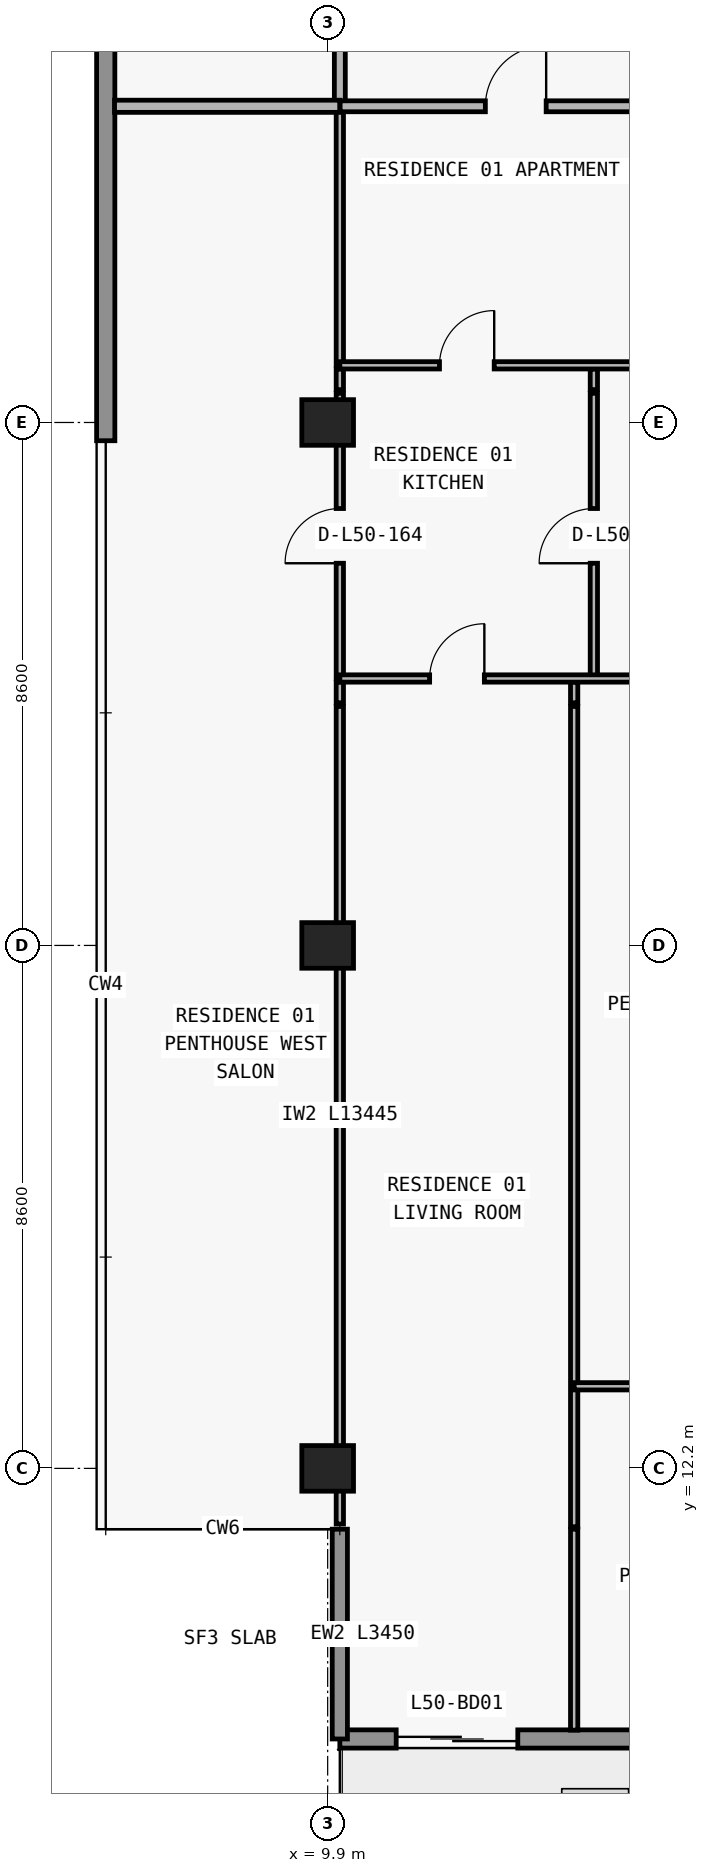
"""IFC4 building model, lengths in metres.
Left out: names, types, materials, properties, quantities, classifications, styles, units other than length and angle.
Written with IfcOpenShell. Run it as: python <this file> out.ifc"""

import sys

from ifc_helpers import new_model, si_unit, direction, frame, frame_2d, origin, origin_2d, place, context, subcontext, project, spatial, rectangle, extrude, element, fill, save


model = new_model("IFC4")
c1 = context("Model", 3, precision=1e-05, world=origin(), true_north=direction((0.0, 1.0)))
c2 = subcontext(c1, "Body", "Model", "MODEL_VIEW")
j1 = project(units=[si_unit("LENGTHUNIT", "METRE"), si_unit("PLANEANGLEUNIT", "RADIAN")], contexts=[c1])
p1 = place(None, origin())
s1 = spatial("IfcSite", under=j1, at=p1, CompositionType="ELEMENT")
p2 = place(p1, origin())
s2 = spatial("IfcBuilding", under=s1, at=p2, CompositionType="ELEMENT")
p3 = place(p2, frame((0.0, 0.0, 180.3)))
s3 = spatial("IfcBuildingStorey", under=s2, at=p3, CompositionType="ELEMENT", Elevation=180.3)
for number, where, z_axis, x_axis in (
    (1, (9.9, 12.2, 0.0), (0.0, 0.0, 1.0), (1.0, 0.0, 0.0)),
    (2, (9.9, 20.8, 0.0), (0.0, 0.0, 1.0), (1.0, 0.0, 0.0)),
    (3, (9.9, 29.4, 0.0), (0.0, 0.0, 1.0), (1.0, 0.0, 0.0)),
):
    element("IfcColumn", number, at=place(p3, frame(where, z_axis=z_axis, x_axis=x_axis)), inside=s3, PredefinedType="COLUMN", context=c2, shape_type="SweptSolid", body=[
        extrude(rectangle(XDim=0.85, YDim=0.75, at=origin_2d()), origin(), (0.0, 0.0, 1.0), 3.0),
    ])
p4 = place(p3, frame((67.7, 7.75, 0.0), z_axis=(0.0, 0.0, 1.0), x_axis=(-1.0, 0.0, 0.0)))
e4 = element("IfcWall", 4, at=p4, inside=s3, PredefinedType="STANDARD", context=c2, shape_type="SweptSolid", body=[
    extrude(rectangle(XDim=57.6, YDim=0.3, at=frame_2d((28.8, 0.0))), origin(), (0.0, 0.0, 1.0), 3.0),
])
p5 = place(p4, frame((54.673, 0.0, 0.0)))
e5 = element("IfcOpeningElement", 5, at=p5, cuts=e4, PredefinedType="OPENING", context=c2, shape_type="SweptSolid", body=[
    extrude(rectangle(XDim=2.0, YDim=2.3, at=frame_2d((1.0, 1.15))), frame((0.0, 0.16, 0.0), z_axis=(0.0, -1.0, 0.0), x_axis=(1.0, 0.0, 0.0)), (0.0, 0.0, 1.0), 0.32),
])
p6 = place(p4, frame((50.473, 0.0, 0.85)))
e6 = element("IfcOpeningElement", 6, at=p6, cuts=e4, PredefinedType="OPENING", context=c2, shape_type="SweptSolid", body=[
    extrude(rectangle(XDim=2.2, YDim=1.55, at=frame_2d((1.1, 0.775))), frame((0.0, 0.16, 0.0), z_axis=(0.0, -1.0, 0.0), x_axis=(1.0, 0.0, 0.0)), (0.0, 0.0, 1.0), 0.32),
])
p7 = place(p4, frame((46.09, 0.0, 0.0)))
e7 = element("IfcOpeningElement", 7, at=p7, cuts=e4, PredefinedType="OPENING", context=c2, shape_type="SweptSolid", body=[
    extrude(rectangle(XDim=2.0, YDim=2.3, at=frame_2d((1.0, 1.15))), frame((0.0, 0.16, 0.0), z_axis=(0.0, -1.0, 0.0), x_axis=(1.0, 0.0, 0.0)), (0.0, 0.0, 1.0), 0.32),
])
p8 = place(p4, frame((41.99, 0.0, 0.85)))
e8 = element("IfcOpeningElement", 8, at=p8, cuts=e4, PredefinedType="OPENING", context=c2, shape_type="SweptSolid", body=[
    extrude(rectangle(XDim=1.8, YDim=1.55, at=frame_2d((0.9, 0.775))), frame((0.0, 0.16, 0.0), z_axis=(0.0, -1.0, 0.0), x_axis=(1.0, 0.0, 0.0)), (0.0, 0.0, 1.0), 0.32),
])
p9 = place(p4, frame((38.09, 0.0, 0.0)))
e9 = element("IfcOpeningElement", 9, at=p9, cuts=e4, PredefinedType="OPENING", context=c2, shape_type="SweptSolid", body=[
    extrude(rectangle(XDim=2.0, YDim=2.3, at=frame_2d((1.0, 1.15))), frame((0.0, 0.16, 0.0), z_axis=(0.0, -1.0, 0.0), x_axis=(1.0, 0.0, 0.0)), (0.0, 0.0, 1.0), 0.32),
])
p10 = place(p4, frame((33.41, 0.0, 0.65)))
e10 = element("IfcOpeningElement", 10, at=p10, cuts=e4, PredefinedType="OPENING", context=c2, shape_type="SweptSolid", body=[
    extrude(rectangle(XDim=2.6, YDim=1.85, at=frame_2d((1.3, 0.925))), frame((0.0, 0.16, 0.0), z_axis=(0.0, -1.0, 0.0), x_axis=(1.0, 0.0, 0.0)), (0.0, 0.0, 1.0), 0.32),
])
p11 = place(p4, frame((27.7, 0.0, 0.85)))
e11 = element("IfcOpeningElement", 11, at=p11, cuts=e4, PredefinedType="OPENING", context=c2, shape_type="SweptSolid", body=[
    extrude(rectangle(XDim=2.2, YDim=1.55, at=frame_2d((1.1, 0.775))), frame((0.0, 0.16, 0.0), z_axis=(0.0, -1.0, 0.0), x_axis=(1.0, 0.0, 0.0)), (0.0, 0.0, 1.0), 0.32),
])
p12 = place(p4, frame((19.7, 0.0, 0.85)))
e12 = element("IfcOpeningElement", 12, at=p12, cuts=e4, PredefinedType="OPENING", context=c2, shape_type="SweptSolid", body=[
    extrude(rectangle(XDim=2.2, YDim=1.55, at=frame_2d((1.1, 0.775))), frame((0.0, 0.16, 0.0), z_axis=(0.0, -1.0, 0.0), x_axis=(1.0, 0.0, 0.0)), (0.0, 0.0, 1.0), 0.32),
])
p13 = place(p4, frame((13.29, 0.0, 0.0)))
e13 = element("IfcOpeningElement", 13, at=p13, cuts=e4, PredefinedType="OPENING", context=c2, shape_type="SweptSolid", body=[
    extrude(rectangle(XDim=2.0, YDim=2.3, at=frame_2d((1.0, 1.15))), frame((0.0, 0.16, 0.0), z_axis=(0.0, -1.0, 0.0), x_axis=(1.0, 0.0, 0.0)), (0.0, 0.0, 1.0), 0.32),
])
p14 = place(p4, frame((9.19, 0.0, 0.85)))
e14 = element("IfcOpeningElement", 14, at=p14, cuts=e4, PredefinedType="OPENING", context=c2, shape_type="SweptSolid", body=[
    extrude(rectangle(XDim=1.8, YDim=1.55, at=frame_2d((0.9, 0.775))), frame((0.0, 0.16, 0.0), z_axis=(0.0, -1.0, 0.0), x_axis=(1.0, 0.0, 0.0)), (0.0, 0.0, 1.0), 0.32),
])
p15 = place(p4, frame((5.273, 0.0, 0.0)))
e15 = element("IfcOpeningElement", 15, at=p15, cuts=e4, PredefinedType="OPENING", context=c2, shape_type="SweptSolid", body=[
    extrude(rectangle(XDim=2.0, YDim=2.3, at=frame_2d((1.0, 1.15))), frame((0.0, 0.16, 0.0), z_axis=(0.0, -1.0, 0.0), x_axis=(1.0, 0.0, 0.0)), (0.0, 0.0, 1.0), 0.32),
])
p16 = place(p4, frame((1.073, 0.0, 0.85)))
e16 = element("IfcOpeningElement", 16, at=p16, cuts=e4, PredefinedType="OPENING", context=c2, shape_type="SweptSolid", body=[
    extrude(rectangle(XDim=2.2, YDim=1.55, at=frame_2d((1.1, 0.775))), frame((0.0, 0.16, 0.0), z_axis=(0.0, -1.0, 0.0), x_axis=(1.0, 0.0, 0.0)), (0.0, 0.0, 1.0), 0.32),
])
p17 = place(p3, frame((10.1, 11.2, 0.0), z_axis=(0.0, 0.0, 1.0), x_axis=(0.0, -1.0, 0.0)))
e17 = element("IfcWall", 17, at=p17, inside=s3, PredefinedType="ELEMENTEDWALL", context=c2, shape_type="SweptSolid", body=[
    extrude(rectangle(XDim=3.45, YDim=0.25, at=frame_2d((1.725, 0.0))), origin(), (0.0, 0.0, 1.0), 3.0),
])
p18 = place(p3, frame((6.25, 29.1, 0.0), z_axis=(0.0, 0.0, 1.0), x_axis=(0.0, 1.0, 0.0)))
e18 = element("IfcWall", 18, at=p18, inside=s3, PredefinedType="STANDARD", context=c2, shape_type="SweptSolid", body=[
    extrude(rectangle(XDim=17.9, YDim=0.3, at=frame_2d((8.95, 0.0))), origin(), (0.0, 0.0, 1.0), 3.0),
])
p19 = place(p3, frame((10.1, 11.285, 0.0), z_axis=(0.0, 0.0, 1.0), x_axis=(0.0, 1.0, 0.0)))
e19 = element("IfcWall", 19, at=p19, inside=s3, PredefinedType="PARTITIONING", context=c2, shape_type="SweptSolid", body=[
    extrude(rectangle(XDim=13.445, YDim=0.12, at=frame_2d((6.723, 0.0))), origin(), (0.0, 0.0, 1.0), 2.213),
])
p20 = place(p3, frame((10.1, 24.79, 0.0), z_axis=(0.0, 0.0, 1.0), x_axis=(0.0, 1.0, 0.0)))
e20 = element("IfcWall", 20, at=p20, inside=s3, PredefinedType="PARTITIONING", context=c2, shape_type="SweptSolid", body=[
    extrude(rectangle(XDim=0.34, YDim=0.12, at=frame_2d((0.17, 0.0))), origin(), (0.0, 0.0, 1.0), 2.213),
])
p21 = place(p3, frame((10.1, 25.19, 0.0), z_axis=(0.0, 0.0, 1.0), x_axis=(0.0, 1.0, 0.0)))
e21 = element("IfcWall", 21, at=p21, inside=s3, PredefinedType="PARTITIONING", context=c2, shape_type="SweptSolid", body=[
    extrude(rectangle(XDim=4.69, YDim=0.12, at=frame_2d((2.345, 0.0))), origin(), (0.0, 0.0, 1.0), 2.213),
])
p22 = place(p21, frame((1.895, 0.0, 0.0)))
e22 = element("IfcOpeningElement", 22, at=p22, cuts=e21, PredefinedType="OPENING", context=c2, shape_type="SweptSolid", body=[
    extrude(rectangle(XDim=0.9, YDim=2.15, at=frame_2d((0.45, 1.075))), frame((0.0, 0.07, 0.0), z_axis=(0.0, -1.0, 0.0), x_axis=(1.0, 0.0, 0.0)), (0.0, 0.0, 1.0), 0.14),
])
p23 = place(p3, frame((10.1, 29.94, 0.0), z_axis=(0.0, 0.0, 1.0), x_axis=(0.0, 1.0, 0.0)))
e23 = element("IfcWall", 23, at=p23, inside=s3, PredefinedType="PARTITIONING", context=c2, shape_type="SweptSolid", body=[
    extrude(rectangle(XDim=0.34, YDim=0.12, at=frame_2d((0.17, 0.0))), origin(), (0.0, 0.0, 1.0), 2.213),
])
p24 = place(p3, frame((10.1, 30.34, 0.0), z_axis=(0.0, 0.0, 1.0), x_axis=(0.0, 1.0, 0.0)))
e24 = element("IfcWall", 24, at=p24, inside=s3, PredefinedType="PARTITIONING", context=c2, shape_type="SweptSolid", body=[
    extrude(rectangle(XDim=4.26, YDim=0.12, at=frame_2d((2.13, 0.0))), origin(), (0.0, 0.0, 1.0), 2.213),
])
p25 = place(p3, frame((10.1, 34.605, 0.0), z_axis=(0.0, 0.0, 1.0), x_axis=(0.0, 1.0, 0.0)))
e25 = element("IfcWall", 25, at=p25, inside=s3, PredefinedType="PARTITIONING", context=c2, shape_type="SweptSolid", body=[
    extrude(rectangle(XDim=2.345, YDim=0.18, at=frame_2d((1.172, 0.0))), origin(), (0.0, 0.0, 1.0), 2.213),
])
p26 = place(p3, frame((13.954, 7.895, 0.0), z_axis=(0.0, 0.0, 1.0), x_axis=(0.0, 1.0, 0.0)))
e26 = element("IfcWall", 26, at=p26, inside=s3, PredefinedType="PARTITIONING", context=c2, shape_type="SweptSolid", body=[
    extrude(rectangle(XDim=3.305, YDim=0.12, at=frame_2d((1.652, 0.0))), origin(), (0.0, 0.0, 1.0), 3.0),
])
p27 = place(p3, frame((13.954, 11.24, 0.0), z_axis=(0.0, 0.0, 1.0), x_axis=(0.0, 1.0, 0.0)))
e27 = element("IfcWall", 27, at=p27, inside=s3, PredefinedType="PARTITIONING", context=c2, shape_type="SweptSolid", body=[
    extrude(rectangle(XDim=13.49, YDim=0.12, at=frame_2d((6.745, 0.0))), origin(), (0.0, 0.0, 1.0), 3.0),
])
p28 = place(p3, frame((13.954, 24.79, 0.0), z_axis=(0.0, 0.0, 1.0), x_axis=(0.0, 1.0, 0.0)))
e28 = element("IfcWall", 28, at=p28, inside=s3, PredefinedType="PARTITIONING", context=c2, shape_type="SweptSolid", body=[
    extrude(rectangle(XDim=0.34, YDim=0.12, at=frame_2d((0.17, 0.0))), origin(), (0.0, 0.0, 1.0), 3.0),
])
p29 = place(p3, frame((14.278, 25.19, 0.0), z_axis=(0.0, 0.0, 1.0), x_axis=(0.0, 1.0, 0.0)))
e29 = element("IfcWall", 29, at=p29, inside=s3, PredefinedType="PARTITIONING", context=c2, shape_type="SweptSolid", body=[
    extrude(rectangle(XDim=4.69, YDim=0.12, at=frame_2d((2.345, 0.0))), origin(), (0.0, 0.0, 1.0), 3.0),
])
p30 = place(p29, frame((1.895, 0.0, 0.0)))
e30 = element("IfcOpeningElement", 30, at=p30, cuts=e29, PredefinedType="OPENING", context=c2, shape_type="SweptSolid", body=[
    extrude(rectangle(XDim=0.9, YDim=2.15, at=frame_2d((0.45, 1.075))), frame((0.0, 0.07, 0.0), z_axis=(0.0, -1.0, 0.0), x_axis=(1.0, 0.0, 0.0)), (0.0, 0.0, 1.0), 0.14),
])
p31 = place(p3, frame((14.278, 29.94, 0.0), z_axis=(0.0, 0.0, 1.0), x_axis=(0.0, 1.0, 0.0)))
e31 = element("IfcWall", 31, at=p31, inside=s3, PredefinedType="PARTITIONING", context=c2, shape_type="SweptSolid", body=[
    extrude(rectangle(XDim=0.34, YDim=0.12, at=frame_2d((0.17, 0.0))), origin(), (0.0, 0.0, 1.0), 3.0),
])
p32 = place(p3, frame((13.954, 13.55, 0.0), z_axis=(0.0, 0.0, 1.0), x_axis=(1.0, 0.0, 0.0)))
e32 = element("IfcWall", 32, at=p32, inside=s3, PredefinedType="PARTITIONING", context=c2, shape_type="SweptSolid", body=[
    extrude(rectangle(XDim=4.296, YDim=0.12, at=frame_2d((2.148, 0.0))), origin(), (0.0, 0.0, 1.0), 3.0),
])
p33 = place(p32, frame((1.698, 0.0, 0.0)))
e33 = element("IfcOpeningElement", 33, at=p33, cuts=e32, PredefinedType="OPENING", context=c2, shape_type="SweptSolid", body=[
    extrude(rectangle(XDim=0.9, YDim=2.15, at=frame_2d((0.45, 1.075))), frame((0.0, 0.07, 0.0), z_axis=(0.0, -1.0, 0.0), x_axis=(1.0, 0.0, 0.0)), (0.0, 0.0, 1.0), 0.14),
])
p34 = place(p3, frame((10.1, 25.19, 0.0), z_axis=(0.0, 0.0, 1.0), x_axis=(1.0, 0.0, 0.0)))
e34 = element("IfcWall", 34, at=p34, inside=s3, PredefinedType="PARTITIONING", context=c2, shape_type="SweptSolid", body=[
    extrude(rectangle(XDim=8.15, YDim=0.12, at=frame_2d((4.075, 0.0))), origin(), (0.0, 0.0, 1.0), 3.0),
])
p35 = place(p34, frame((1.477, 0.0, 0.0)))
e35 = element("IfcOpeningElement", 35, at=p35, cuts=e34, PredefinedType="OPENING", context=c2, shape_type="SweptSolid", body=[
    extrude(rectangle(XDim=0.9, YDim=2.15, at=frame_2d((0.45, 1.075))), frame((0.0, 0.07, 0.0), z_axis=(0.0, -1.0, 0.0), x_axis=(1.0, 0.0, 0.0)), (0.0, 0.0, 1.0), 0.14),
])
p36 = place(p34, frame((5.714, 0.0, 0.0)))
e36 = element("IfcOpeningElement", 36, at=p36, cuts=e34, PredefinedType="OPENING", context=c2, shape_type="SweptSolid", body=[
    extrude(rectangle(XDim=0.9, YDim=2.15, at=frame_2d((0.45, 1.075))), frame((0.0, 0.07, 0.0), z_axis=(0.0, -1.0, 0.0), x_axis=(1.0, 0.0, 0.0)), (0.0, 0.0, 1.0), 0.14),
])
p37 = place(p3, frame((10.1, 30.34, 0.0), z_axis=(0.0, 0.0, 1.0), x_axis=(1.0, 0.0, 0.0)))
e37 = element("IfcWall", 37, at=p37, inside=s3, PredefinedType="PARTITIONING", context=c2, shape_type="SweptSolid", body=[
    extrude(rectangle(XDim=8.15, YDim=0.12, at=frame_2d((4.075, 0.0))), origin(), (0.0, 0.0, 1.0), 3.0),
])
p38 = place(p37, frame((1.639, 0.0, 0.0)))
e38 = element("IfcOpeningElement", 38, at=p38, cuts=e37, PredefinedType="OPENING", context=c2, shape_type="SweptSolid", body=[
    extrude(rectangle(XDim=0.9, YDim=2.15, at=frame_2d((0.45, 1.075))), frame((0.0, 0.07, 0.0), z_axis=(0.0, -1.0, 0.0), x_axis=(1.0, 0.0, 0.0)), (0.0, 0.0, 1.0), 0.14),
])
p39 = place(p3, frame((6.395, 34.6, 0.0), z_axis=(0.0, 0.0, 1.0), x_axis=(1.0, 0.0, 0.0)))
e39 = element("IfcWall", 39, at=p39, inside=s3, PredefinedType="PARTITIONING", context=c2, shape_type="SweptSolid", body=[
    extrude(rectangle(XDim=3.705, YDim=0.2, at=frame_2d((1.853, 0.0))), origin(), (0.0, 0.0, 1.0), 3.0),
])
p40 = place(p3, frame((10.105, 34.6, 0.0), z_axis=(0.0, 0.0, 1.0), x_axis=(1.0, 0.0, 0.0)))
e40 = element("IfcWall", 40, at=p40, inside=s3, PredefinedType="PARTITIONING", context=c2, shape_type="SweptSolid", body=[
    extrude(rectangle(XDim=8.145, YDim=0.18, at=frame_2d((4.073, 0.0))), origin(), (0.0, 0.0, 1.0), 3.0),
])
p41 = place(p40, frame((2.388, 0.0, 0.0)))
e41 = element("IfcOpeningElement", 41, at=p41, cuts=e40, PredefinedType="OPENING", context=c2, shape_type="SweptSolid", body=[
    extrude(rectangle(XDim=1.0, YDim=2.2, at=frame_2d((0.5, 1.1))), frame((0.0, 0.1, 0.0), z_axis=(0.0, -1.0, 0.0), x_axis=(1.0, 0.0, 0.0)), (0.0, 0.0, 1.0), 0.2),
])
p42 = place(p5, origin())
e42 = element("IfcDoor", 42, at=p42, inside=s3, OperationType="DOUBLE_DOOR_SLIDING", PredefinedType="DOOR", context=c2, shape_type="SweptSolid", body=[
    extrude(rectangle(XDim=2.0, YDim=2.3, at=frame_2d((1.0, 1.15))), frame((0.0, 0.025, 0.0), z_axis=(0.0, -1.0, 0.0), x_axis=(1.0, 0.0, 0.0)), (0.0, 0.0, 1.0), 0.05),
])
fill(e5, e42)
p43 = place(p41, origin())
e43 = element("IfcDoor", 43, at=p43, inside=s3, OperationType="SINGLE_SWING_RIGHT", PredefinedType="DOOR", context=c2, shape_type="SweptSolid", body=[
    extrude(rectangle(XDim=1.0, YDim=2.2, at=frame_2d((0.5, 1.1))), frame((0.0, 0.025, 0.0), z_axis=(0.0, -1.0, 0.0), x_axis=(1.0, 0.0, 0.0)), (0.0, 0.0, 1.0), 0.05),
])
fill(e41, e43)
p44 = place(p38, origin())
e44 = element("IfcDoor", 44, at=p44, inside=s3, OperationType="SINGLE_SWING_RIGHT", PredefinedType="DOOR", context=c2, shape_type="SweptSolid", body=[
    extrude(rectangle(XDim=0.9, YDim=2.15, at=frame_2d((0.45, 1.075))), frame((0.0, 0.025, 0.0), z_axis=(0.0, -1.0, 0.0), x_axis=(1.0, 0.0, 0.0)), (0.0, 0.0, 1.0), 0.05),
])
fill(e38, e44)
p45 = place(p30, origin())
e45 = element("IfcDoor", 45, at=p45, inside=s3, OperationType="SINGLE_SWING_LEFT", PredefinedType="DOOR", context=c2, shape_type="SweptSolid", body=[
    extrude(rectangle(XDim=0.9, YDim=2.15, at=frame_2d((0.45, 1.075))), frame((0.0, 0.025, 0.0), z_axis=(0.0, -1.0, 0.0), x_axis=(1.0, 0.0, 0.0)), (0.0, 0.0, 1.0), 0.05),
])
fill(e30, e45)
p46 = place(p35, origin())
e46 = element("IfcDoor", 46, at=p46, inside=s3, OperationType="SINGLE_SWING_RIGHT", PredefinedType="DOOR", context=c2, shape_type="SweptSolid", body=[
    extrude(rectangle(XDim=0.9, YDim=2.15, at=frame_2d((0.45, 1.075))), frame((0.0, 0.025, 0.0), z_axis=(0.0, -1.0, 0.0), x_axis=(1.0, 0.0, 0.0)), (0.0, 0.0, 1.0), 0.05),
])
fill(e35, e46)
p47 = place(p22, origin())
e47 = element("IfcDoor", 47, at=p47, inside=s3, OperationType="SINGLE_SWING_LEFT", PredefinedType="DOOR", context=c2, shape_type="SweptSolid", body=[
    extrude(rectangle(XDim=0.9, YDim=2.15, at=frame_2d((0.45, 1.075))), frame((0.0, 0.025, 0.0), z_axis=(0.0, -1.0, 0.0), x_axis=(1.0, 0.0, 0.0)), (0.0, 0.0, 1.0), 0.05),
])
fill(e22, e47)
save(model, sys.argv[1])
